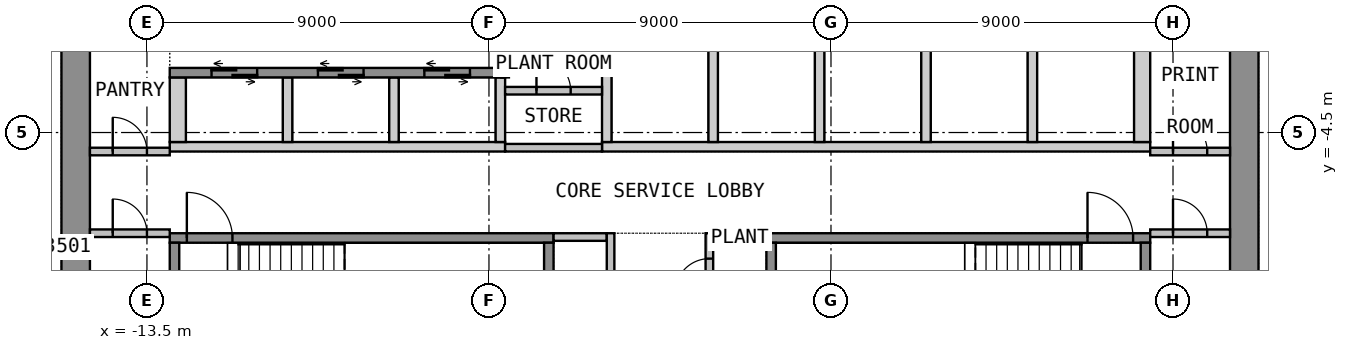
"""IFC4 building model, lengths in metres.
Left out: names, types, materials, properties, quantities, classifications, styles, units other than length and angle.
Written with IfcOpenShell. Run it as: python <this file> out.ifc"""

import sys

from ifc_helpers import new_model, si_unit, direction, frame, frame_2d, origin, place, context, subcontext, project, spatial, polyline, rectangle, outline, extrude, element, fill, save


model = new_model("IFC4")
c1 = context("Model", 3, precision=1e-05, world=origin(), true_north=direction((0.0, 1.0)))
c2 = subcontext(c1, "Body", "Model", "MODEL_VIEW")
j1 = project(units=[si_unit("LENGTHUNIT", "METRE"), si_unit("PLANEANGLEUNIT", "RADIAN")], contexts=[c1])
p1 = place(None, origin())
s1 = spatial("IfcSite", under=j1, at=p1, CompositionType="ELEMENT")
p2 = place(p1, origin())
s2 = spatial("IfcBuilding", under=s1, at=p2, CompositionType="ELEMENT")
p3 = place(p2, frame((0.0, 0.0, 144.3)))
s3 = spatial("IfcBuildingStorey", under=s2, at=p3, CompositionType="ELEMENT", Elevation=144.3)
p4 = place(p3, frame((-15.375, -12.75, 0.0), z_axis=(0.0, 0.0, 1.0), x_axis=(0.0, 1.0, 0.0)))
e1 = element("IfcWall", 1, at=p4, inside=s3, PredefinedType="SHEAR", context=c2, shape_type="SweptSolid", body=[
    extrude(rectangle(XDim=25.5, YDim=0.75, at=frame_2d((12.75, 0.0))), origin(), (0.0, 0.0, 1.0), 3.575),
])
p5 = place(p4, frame((11.55, 0.0, 0.0)))
e2 = element("IfcOpeningElement", 2, at=p5, cuts=e1, PredefinedType="OPENING", context=c2, shape_type="SweptSolid", body=[
    extrude(rectangle(XDim=2.4, YDim=2.1, at=frame_2d((1.2, 1.05))), frame((0.0, 0.385, 0.0), z_axis=(0.0, -1.0, 0.0), x_axis=(1.0, 0.0, 0.0)), (0.0, 0.0, 1.0), 0.77),
])
p6 = place(p3, frame((15.375, -12.75, 0.0), z_axis=(0.0, 0.0, 1.0), x_axis=(0.0, 1.0, 0.0)))
e3 = element("IfcWall", 3, at=p6, inside=s3, PredefinedType="SHEAR", context=c2, shape_type="SweptSolid", body=[
    extrude(rectangle(XDim=25.5, YDim=0.75, at=frame_2d((12.75, 0.0))), origin(), (0.0, 0.0, 1.0), 3.575),
])
p7 = place(p6, frame((11.55, 0.0, 0.0)))
e4 = element("IfcOpeningElement", 4, at=p7, cuts=e3, PredefinedType="OPENING", context=c2, shape_type="SweptSolid", body=[
    extrude(rectangle(XDim=2.4, YDim=2.1, at=frame_2d((1.2, 1.05))), frame((0.0, 0.385, 0.0), z_axis=(0.0, -1.0, 0.0), x_axis=(1.0, 0.0, 0.0)), (0.0, 0.0, 1.0), 0.77),
])
p8 = place(p3, origin())
e5 = element("IfcWall", 5, at=p8, inside=s3, PredefinedType="SHEAR", context=c2, shape_type="SweptSolid", body=[
    extrude(outline(polyline([(-12.9, -5.0), (-4.075, -5.0), (-4.075, -4.75), (-12.9, -4.75), (-12.9, -5.0)])), origin(), (0.0, 0.0, 1.0), 3.575),
])
p9 = place(p3, origin())
e6 = element("IfcWall", 6, at=p9, inside=s3, PredefinedType="SHEAR", context=c2, shape_type="SweptSolid", body=[
    extrude(outline(polyline([(-1.525, -5.0), (12.9, -5.0), (12.9, -4.75), (-1.525, -4.75), (-1.525, -5.0)])), origin(), (0.0, 0.0, 1.0), 3.575),
])
p10 = place(p3, origin())
e7 = element("IfcWall", 7, at=p10, inside=s3, PredefinedType="SHEAR", context=c2, shape_type="SweptSolid", body=[
    extrude(outline(polyline([(-12.9, -4.75), (-12.475, -4.75), (-12.475, -3.05), (-12.9, -3.05), (-12.9, -4.75)])), origin(), (0.0, 0.0, 1.0), 3.575),
])
p11 = place(p3, origin())
e8 = element("IfcWall", 8, at=p11, inside=s3, PredefinedType="SHEAR", context=c2, shape_type="SweptSolid", body=[
    extrude(outline(polyline([(-9.925, -4.75), (-9.675, -4.75), (-9.675, -3.05), (-9.925, -3.05), (-9.925, -4.75)])), origin(), (0.0, 0.0, 1.0), 3.575),
])
p12 = place(p3, origin())
e9 = element("IfcWall", 9, at=p12, inside=s3, PredefinedType="SHEAR", context=c2, shape_type="SweptSolid", body=[
    extrude(outline(polyline([(-7.125, -4.75), (-6.875, -4.75), (-6.875, -3.05), (-7.125, -3.05), (-7.125, -4.75)])), origin(), (0.0, 0.0, 1.0), 3.575),
])
p13 = place(p3, origin())
e10 = element("IfcWall", 10, at=p13, inside=s3, PredefinedType="SHEAR", context=c2, shape_type="SweptSolid", body=[
    extrude(outline(polyline([(-4.325, -4.75), (-4.075, -4.75), (-4.075, -3.05), (-4.325, -3.05), (-4.325, -4.75)])), origin(), (0.0, 0.0, 1.0), 3.575),
])
p14 = place(p3, origin())
e11 = element("IfcWall", 11, at=p14, inside=s3, PredefinedType="SHEAR", context=c2, shape_type="SweptSolid", body=[
    extrude(outline(polyline([(-1.525, -4.75), (-1.275, -4.75), (-1.275, -2.05), (-1.525, -2.05), (-1.525, -4.75)])), origin(), (0.0, 0.0, 1.0), 3.575),
])
p15 = place(p3, origin())
e12 = element("IfcWall", 12, at=p15, inside=s3, PredefinedType="SHEAR", context=c2, shape_type="SweptSolid", body=[
    extrude(outline(polyline([(1.275, -4.75), (1.525, -4.75), (1.525, -2.05), (1.275, -2.05), (1.275, -4.75)])), origin(), (0.0, 0.0, 1.0), 3.575),
])
p16 = place(p3, origin())
e13 = element("IfcWall", 13, at=p16, inside=s3, PredefinedType="SHEAR", context=c2, shape_type="SweptSolid", body=[
    extrude(outline(polyline([(4.075, -4.75), (4.325, -4.75), (4.325, -2.05), (4.075, -2.05), (4.075, -4.75)])), origin(), (0.0, 0.0, 1.0), 3.575),
])
p17 = place(p3, origin())
e14 = element("IfcWall", 14, at=p17, inside=s3, PredefinedType="SHEAR", context=c2, shape_type="SweptSolid", body=[
    extrude(outline(polyline([(6.875, -4.75), (7.125, -4.75), (7.125, -2.05), (6.875, -2.05), (6.875, -4.75)])), origin(), (0.0, 0.0, 1.0), 3.575),
])
p18 = place(p3, origin())
e15 = element("IfcWall", 15, at=p18, inside=s3, PredefinedType="SHEAR", context=c2, shape_type="SweptSolid", body=[
    extrude(outline(polyline([(9.675, -4.75), (9.925, -4.75), (9.925, -2.05), (9.675, -2.05), (9.675, -4.75)])), origin(), (0.0, 0.0, 1.0), 3.575),
])
p19 = place(p3, origin())
e16 = element("IfcWall", 16, at=p19, inside=s3, PredefinedType="SHEAR", context=c2, shape_type="SweptSolid", body=[
    extrude(outline(polyline([(12.475, -4.75), (12.9, -4.75), (12.9, -2.05), (12.475, -2.05), (12.475, -4.75)])), origin(), (0.0, 0.0, 1.0), 3.575),
])
p20 = place(p3, frame((-12.9, -2.925, 0.0), z_axis=(0.0, 0.0, 1.0), x_axis=(1.0, 0.0, 0.0)))
e17 = element("IfcWall", 17, at=p20, inside=s3, PredefinedType="SHEAR", context=c2, shape_type="SweptSolid", body=[
    extrude(rectangle(XDim=8.825, YDim=0.25, at=frame_2d((4.413, 0.0))), origin(), (0.0, 0.0, 1.0), 3.575),
])
p21 = place(p20, frame((1.1, 0.0, 0.0)))
e18 = element("IfcOpeningElement", 18, at=p21, cuts=e17, PredefinedType="OPENING", context=c2, shape_type="SweptSolid", body=[
    extrude(rectangle(XDim=1.2, YDim=2.1, at=frame_2d((0.6, 1.05))), frame((0.0, 0.135, 0.0), z_axis=(0.0, -1.0, 0.0), x_axis=(1.0, 0.0, 0.0)), (0.0, 0.0, 1.0), 0.27),
])
p22 = place(p20, frame((3.9, 0.0, 0.0)))
e19 = element("IfcOpeningElement", 19, at=p22, cuts=e17, PredefinedType="OPENING", context=c2, shape_type="SweptSolid", body=[
    extrude(rectangle(XDim=1.2, YDim=2.1, at=frame_2d((0.6, 1.05))), frame((0.0, 0.135, 0.0), z_axis=(0.0, -1.0, 0.0), x_axis=(1.0, 0.0, 0.0)), (0.0, 0.0, 1.0), 0.27),
])
p23 = place(p20, frame((6.7, 0.0, 0.0)))
e20 = element("IfcOpeningElement", 20, at=p23, cuts=e17, PredefinedType="OPENING", context=c2, shape_type="SweptSolid", body=[
    extrude(rectangle(XDim=1.2, YDim=2.1, at=frame_2d((0.6, 1.05))), frame((0.0, 0.135, 0.0), z_axis=(0.0, -1.0, 0.0), x_axis=(1.0, 0.0, 0.0)), (0.0, 0.0, 1.0), 0.27),
])
p24 = place(p3, frame((-12.9, -7.275, 0.0), z_axis=(0.0, 0.0, 1.0), x_axis=(1.0, 0.0, 0.0)))
e21 = element("IfcWall", 21, at=p24, inside=s3, PredefinedType="SHEAR", context=c2, shape_type="SweptSolid", body=[
    extrude(rectangle(XDim=10.1, YDim=0.25, at=frame_2d((5.05, 0.0))), origin(), (0.0, 0.0, 1.0), 3.575),
])
p25 = place(p24, frame((0.45, 0.0, 0.0)))
e22 = element("IfcOpeningElement", 22, at=p25, cuts=e21, PredefinedType="OPENING", context=c2, shape_type="SweptSolid", body=[
    extrude(rectangle(XDim=1.2, YDim=2.1, at=frame_2d((0.6, 1.05))), frame((0.0, 0.135, 0.0), z_axis=(0.0, -1.0, 0.0), x_axis=(1.0, 0.0, 0.0)), (0.0, 0.0, 1.0), 0.27),
])
for number, where, z_axis, x_axis in (
    (23, (-12.775, -10.65, 0.0), (0.0, 0.0, 1.0), (0.0, 1.0, 0.0)),
    (24, (-2.925, -10.65, 0.0), (0.0, 0.0, 1.0), (0.0, 1.0, 0.0)),
):
    element("IfcWall", number, at=place(p3, frame(where, z_axis=z_axis, x_axis=x_axis)), inside=s3, PredefinedType="SHEAR", context=c2, shape_type="SweptSolid", body=[
        extrude(rectangle(XDim=3.25, YDim=0.25, at=frame_2d((1.625, 0.0))), origin(), (0.0, 0.0, 1.0), 3.575),
    ])
p26 = place(p3, frame((2.8, -7.275, 0.0), z_axis=(0.0, 0.0, 1.0), x_axis=(1.0, 0.0, 0.0)))
e25 = element("IfcWall", 25, at=p26, inside=s3, PredefinedType="SHEAR", context=c2, shape_type="SweptSolid", body=[
    extrude(rectangle(XDim=10.1, YDim=0.25, at=frame_2d((5.05, 0.0))), origin(), (0.0, 0.0, 1.0), 3.575),
])
p27 = place(p26, frame((8.45, 0.0, 0.0)))
e26 = element("IfcOpeningElement", 26, at=p27, cuts=e25, PredefinedType="OPENING", context=c2, shape_type="SweptSolid", body=[
    extrude(rectangle(XDim=1.2, YDim=2.1, at=frame_2d((0.6, 1.05))), frame((0.0, 0.135, 0.0), z_axis=(0.0, -1.0, 0.0), x_axis=(1.0, 0.0, 0.0)), (0.0, 0.0, 1.0), 0.27),
])
for number, where, z_axis, x_axis in (
    (27, (2.925, -10.65, 0.0), (0.0, 0.0, 1.0), (0.0, 1.0, 0.0)),
    (28, (12.775, -10.65, 0.0), (0.0, 0.0, 1.0), (0.0, 1.0, 0.0)),
):
    element("IfcWall", number, at=place(p3, frame(where, z_axis=z_axis, x_axis=x_axis)), inside=s3, PredefinedType="SHEAR", context=c2, shape_type="SweptSolid", body=[
        extrude(rectangle(XDim=3.25, YDim=0.25, at=frame_2d((1.625, 0.0))), origin(), (0.0, 0.0, 1.0), 3.575),
    ])
for number, where, z_axis, x_axis in (
    (29, (-2.8, -7.25, 0.0), (0.0, 0.0, 1.0), (1.0, 0.0, 0.0)),
    (30, (1.4, -7.25, 0.0), (0.0, 0.0, 1.0), (1.0, 0.0, 0.0)),
):
    element("IfcWall", number, at=place(p3, frame(where, z_axis=z_axis, x_axis=x_axis)), inside=s3, PredefinedType="PARTITIONING", context=c2, shape_type="SweptSolid", body=[
        extrude(rectangle(XDim=1.4, YDim=0.2, at=frame_2d((0.7, 0.0))), origin(), (0.0, 0.0, 1.0), 3.575),
    ])
p28 = place(p3, frame((-1.3, -12.75, 0.0), z_axis=(0.0, 0.0, 1.0), x_axis=(0.0, 1.0, 0.0)))
e31 = element("IfcWall", 31, at=p28, inside=s3, PredefinedType="PARTITIONING", context=c2, shape_type="SweptSolid", body=[
    extrude(rectangle(XDim=5.6, YDim=0.2, at=frame_2d((2.8, 0.0))), origin(), (0.0, 0.0, 1.0), 3.575),
])
p29 = place(p28, frame((2.25, 0.0, 0.0)))
e32 = element("IfcOpeningElement", 32, at=p29, cuts=e31, PredefinedType="OPENING", context=c2, shape_type="SweptSolid", body=[
    extrude(rectangle(XDim=0.9, YDim=2.1, at=frame_2d((0.45, 1.05))), frame((0.0, 0.11, 0.0), z_axis=(0.0, -1.0, 0.0), x_axis=(1.0, 0.0, 0.0)), (0.0, 0.0, 1.0), 0.22),
])
p30 = place(p3, frame((1.3, -12.75, 0.0), z_axis=(0.0, 0.0, 1.0), x_axis=(0.0, 1.0, 0.0)))
e33 = element("IfcWall", 33, at=p30, inside=s3, PredefinedType="PARTITIONING", context=c2, shape_type="SweptSolid", body=[
    extrude(rectangle(XDim=5.6, YDim=0.2, at=frame_2d((2.8, 0.0))), origin(), (0.0, 0.0, 1.0), 3.575),
])
p31 = place(p30, frame((0.441, 0.0, 0.0)))
e34 = element("IfcOpeningElement", 34, at=p31, cuts=e33, PredefinedType="OPENING", context=c2, shape_type="SweptSolid", body=[
    extrude(rectangle(XDim=0.9, YDim=2.1, at=frame_2d((0.45, 1.05))), frame((0.0, 0.11, 0.0), z_axis=(0.0, -1.0, 0.0), x_axis=(1.0, 0.0, 0.0)), (0.0, 0.0, 1.0), 0.22),
])
p32 = place(p30, frame((2.223, 0.0, 0.0)))
e35 = element("IfcOpeningElement", 35, at=p32, cuts=e33, PredefinedType="OPENING", context=c2, shape_type="SweptSolid", body=[
    extrude(rectangle(XDim=0.9, YDim=2.1, at=frame_2d((0.45, 1.05))), frame((0.0, 0.11, 0.0), z_axis=(0.0, -1.0, 0.0), x_axis=(1.0, 0.0, 0.0)), (0.0, 0.0, 1.0), 0.22),
])
p33 = place(p30, frame((4.032, 0.0, 0.0)))
e36 = element("IfcOpeningElement", 36, at=p33, cuts=e33, PredefinedType="OPENING", context=c2, shape_type="SweptSolid", body=[
    extrude(rectangle(XDim=0.9, YDim=2.1, at=frame_2d((0.45, 1.05))), frame((0.0, 0.11, 0.0), z_axis=(0.0, -1.0, 0.0), x_axis=(1.0, 0.0, 0.0)), (0.0, 0.0, 1.0), 0.22),
])
p34 = place(p3, frame((-15.0, -7.15, 0.0), z_axis=(0.0, 0.0, 1.0), x_axis=(1.0, 0.0, 0.0)))
e37 = element("IfcWall", 37, at=p34, inside=s3, PredefinedType="PARTITIONING", context=c2, shape_type="SweptSolid", body=[
    extrude(rectangle(XDim=2.1, YDim=0.2, at=frame_2d((1.05, 0.0))), origin(), (0.0, 0.0, 1.0), 3.575),
])
p35 = place(p34, frame((0.6, 0.0, 0.0)))
e38 = element("IfcOpeningElement", 38, at=p35, cuts=e37, PredefinedType="OPENING", context=c2, shape_type="SweptSolid", body=[
    extrude(rectangle(XDim=0.9, YDim=2.1, at=frame_2d((0.45, 1.05))), frame((0.0, 0.11, 0.0), z_axis=(0.0, -1.0, 0.0), x_axis=(1.0, 0.0, 0.0)), (0.0, 0.0, 1.0), 0.22),
])
p36 = place(p3, frame((-15.0, -5.0, 0.0), z_axis=(0.0, 0.0, 1.0), x_axis=(1.0, 0.0, 0.0)))
e39 = element("IfcWall", 39, at=p36, inside=s3, PredefinedType="PARTITIONING", context=c2, shape_type="SweptSolid", body=[
    extrude(rectangle(XDim=2.1, YDim=0.2, at=frame_2d((1.05, 0.0))), origin(), (0.0, 0.0, 1.0), 3.575),
])
p37 = place(p36, frame((0.6, 0.0, 0.0)))
e40 = element("IfcOpeningElement", 40, at=p37, cuts=e39, PredefinedType="OPENING", context=c2, shape_type="SweptSolid", body=[
    extrude(rectangle(XDim=0.9, YDim=2.1, at=frame_2d((0.45, 1.05))), frame((0.0, 0.11, 0.0), z_axis=(0.0, -1.0, 0.0), x_axis=(1.0, 0.0, 0.0)), (0.0, 0.0, 1.0), 0.22),
])
p38 = place(p3, frame((12.9, -7.15, 0.0), z_axis=(0.0, 0.0, 1.0), x_axis=(1.0, 0.0, 0.0)))
e41 = element("IfcWall", 41, at=p38, inside=s3, PredefinedType="PARTITIONING", context=c2, shape_type="SweptSolid", body=[
    extrude(rectangle(XDim=2.1, YDim=0.2, at=frame_2d((1.05, 0.0))), origin(), (0.0, 0.0, 1.0), 3.575),
])
p39 = place(p38, frame((0.6, 0.0, 0.0)))
e42 = element("IfcOpeningElement", 42, at=p39, cuts=e41, PredefinedType="OPENING", context=c2, shape_type="SweptSolid", body=[
    extrude(rectangle(XDim=0.9, YDim=2.1, at=frame_2d((0.45, 1.05))), frame((0.0, 0.11, 0.0), z_axis=(0.0, -1.0, 0.0), x_axis=(1.0, 0.0, 0.0)), (0.0, 0.0, 1.0), 0.22),
])
p40 = place(p3, frame((12.9, -5.0, 0.0), z_axis=(0.0, 0.0, 1.0), x_axis=(1.0, 0.0, 0.0)))
e43 = element("IfcWall", 43, at=p40, inside=s3, PredefinedType="PARTITIONING", context=c2, shape_type="SweptSolid", body=[
    extrude(rectangle(XDim=2.1, YDim=0.2, at=frame_2d((1.05, 0.0))), origin(), (0.0, 0.0, 1.0), 3.575),
])
p41 = place(p40, frame((0.6, 0.0, 0.0)))
e44 = element("IfcOpeningElement", 44, at=p41, cuts=e43, PredefinedType="OPENING", context=c2, shape_type="SweptSolid", body=[
    extrude(rectangle(XDim=0.9, YDim=2.1, at=frame_2d((0.45, 1.05))), frame((0.0, 0.11, 0.0), z_axis=(0.0, -1.0, 0.0), x_axis=(1.0, 0.0, 0.0)), (0.0, 0.0, 1.0), 0.22),
])
p42 = place(p3, frame((-4.075, -3.4, 0.0), z_axis=(0.0, 0.0, 1.0), x_axis=(1.0, 0.0, 0.0)))
e45 = element("IfcWall", 45, at=p42, inside=s3, PredefinedType="PARTITIONING", context=c2, shape_type="SweptSolid", body=[
    extrude(rectangle(XDim=2.55, YDim=0.2, at=frame_2d((1.275, 0.0))), origin(), (0.0, 0.0, 1.0), 3.575),
])
p43 = place(p42, frame((0.825, 0.0, 0.0)))
e46 = element("IfcOpeningElement", 46, at=p43, cuts=e45, PredefinedType="OPENING", context=c2, shape_type="SweptSolid", body=[
    extrude(rectangle(XDim=0.9, YDim=2.1, at=frame_2d((0.45, 1.05))), frame((0.0, 0.11, 0.0), z_axis=(0.0, -1.0, 0.0), x_axis=(1.0, 0.0, 0.0)), (0.0, 0.0, 1.0), 0.22),
])
p44 = place(p3, frame((-4.075, -4.9, 0.0), z_axis=(0.0, 0.0, 1.0), x_axis=(1.0, 0.0, 0.0)))
e47 = element("IfcWall", 47, at=p44, inside=s3, PredefinedType="PARTITIONING", context=c2, shape_type="SweptSolid", body=[
    extrude(rectangle(XDim=2.55, YDim=0.2, at=frame_2d((1.275, 0.0))), origin(), (0.0, 0.0, 1.0), 3.575),
])
p45 = place(p3, frame((-4.075, -1.9, 0.0), z_axis=(0.0, 0.0, 1.0), x_axis=(0.0, -1.0, 0.0)))
e48 = element("IfcWall", 48, at=p45, inside=s3, PredefinedType="PARTITIONING", context=c2, shape_type="SweptSolid", body=[
    extrude(rectangle(XDim=1.15, YDim=0.2, at=frame_2d((0.575, 0.0))), origin(), (0.0, 0.0, 1.0), 3.575),
])
p46 = place(p21, origin())
e49 = element("IfcDoor", 49, at=p46, inside=s3, OperationType="DOUBLE_DOOR_SLIDING", PredefinedType="DOOR", context=c2, shape_type="SweptSolid", body=[
    extrude(rectangle(XDim=1.2, YDim=2.1, at=frame_2d((0.6, 1.05))), frame((0.0, 0.025, 0.0), z_axis=(0.0, -1.0, 0.0), x_axis=(1.0, 0.0, 0.0)), (0.0, 0.0, 1.0), 0.05),
])
fill(e18, e49)
p47 = place(p22, origin())
e50 = element("IfcDoor", 50, at=p47, inside=s3, OperationType="DOUBLE_DOOR_SLIDING", PredefinedType="DOOR", context=c2, shape_type="SweptSolid", body=[
    extrude(rectangle(XDim=1.2, YDim=2.1, at=frame_2d((0.6, 1.05))), frame((0.0, 0.025, 0.0), z_axis=(0.0, -1.0, 0.0), x_axis=(1.0, 0.0, 0.0)), (0.0, 0.0, 1.0), 0.05),
])
fill(e19, e50)
p48 = place(p23, origin())
e51 = element("IfcDoor", 51, at=p48, inside=s3, OperationType="DOUBLE_DOOR_SLIDING", PredefinedType="DOOR", context=c2, shape_type="SweptSolid", body=[
    extrude(rectangle(XDim=1.2, YDim=2.1, at=frame_2d((0.6, 1.05))), frame((0.0, 0.025, 0.0), z_axis=(0.0, -1.0, 0.0), x_axis=(1.0, 0.0, 0.0)), (0.0, 0.0, 1.0), 0.05),
])
fill(e20, e51)
p49 = place(p25, origin())
e52 = element("IfcDoor", 52, at=p49, inside=s3, OperationType="SINGLE_SWING_LEFT", PredefinedType="DOOR", context=c2, shape_type="SweptSolid", body=[
    extrude(rectangle(XDim=1.2, YDim=2.1, at=frame_2d((0.6, 1.05))), frame((0.0, 0.025, 0.0), z_axis=(0.0, -1.0, 0.0), x_axis=(1.0, 0.0, 0.0)), (0.0, 0.0, 1.0), 0.05),
])
fill(e22, e52)
p50 = place(p27, origin())
e53 = element("IfcDoor", 53, at=p50, inside=s3, OperationType="SINGLE_SWING_LEFT", PredefinedType="DOOR", context=c2, shape_type="SweptSolid", body=[
    extrude(rectangle(XDim=1.2, YDim=2.1, at=frame_2d((0.6, 1.05))), frame((0.0, 0.025, 0.0), z_axis=(0.0, -1.0, 0.0), x_axis=(1.0, 0.0, 0.0)), (0.0, 0.0, 1.0), 0.05),
])
fill(e26, e53)
p51 = place(p33, origin())
e54 = element("IfcDoor", 54, at=p51, inside=s3, OperationType="SINGLE_SWING_LEFT", PredefinedType="DOOR", context=c2, shape_type="SweptSolid", body=[
    extrude(rectangle(XDim=0.9, YDim=2.1, at=frame_2d((0.45, 1.05))), frame((0.0, 0.025, 0.0), z_axis=(0.0, -1.0, 0.0), x_axis=(1.0, 0.0, 0.0)), (0.0, 0.0, 1.0), 0.05),
])
fill(e36, e54)
p52 = place(p35, origin())
e55 = element("IfcDoor", 55, at=p52, inside=s3, OperationType="SINGLE_SWING_LEFT", PredefinedType="DOOR", context=c2, shape_type="SweptSolid", body=[
    extrude(rectangle(XDim=0.9, YDim=2.1, at=frame_2d((0.45, 1.05))), frame((0.0, 0.025, 0.0), z_axis=(0.0, -1.0, 0.0), x_axis=(1.0, 0.0, 0.0)), (0.0, 0.0, 1.0), 0.05),
])
fill(e38, e55)
p53 = place(p37, origin())
e56 = element("IfcDoor", 56, at=p53, inside=s3, OperationType="SINGLE_SWING_LEFT", PredefinedType="DOOR", context=c2, shape_type="SweptSolid", body=[
    extrude(rectangle(XDim=0.9, YDim=2.1, at=frame_2d((0.45, 1.05))), frame((0.0, 0.025, 0.0), z_axis=(0.0, -1.0, 0.0), x_axis=(1.0, 0.0, 0.0)), (0.0, 0.0, 1.0), 0.05),
])
fill(e40, e56)
p54 = place(p39, origin())
e57 = element("IfcDoor", 57, at=p54, inside=s3, OperationType="SINGLE_SWING_LEFT", PredefinedType="DOOR", context=c2, shape_type="SweptSolid", body=[
    extrude(rectangle(XDim=0.9, YDim=2.1, at=frame_2d((0.45, 1.05))), frame((0.0, 0.025, 0.0), z_axis=(0.0, -1.0, 0.0), x_axis=(1.0, 0.0, 0.0)), (0.0, 0.0, 1.0), 0.05),
])
fill(e42, e57)
p55 = place(p41, origin())
e58 = element("IfcDoor", 58, at=p55, inside=s3, OperationType="SINGLE_SWING_LEFT", PredefinedType="DOOR", context=c2, shape_type="SweptSolid", body=[
    extrude(rectangle(XDim=0.9, YDim=2.1, at=frame_2d((0.45, 1.05))), frame((0.0, 0.025, 0.0), z_axis=(0.0, -1.0, 0.0), x_axis=(1.0, 0.0, 0.0)), (0.0, 0.0, 1.0), 0.05),
])
fill(e44, e58)
p56 = place(p43, origin())
e59 = element("IfcDoor", 59, at=p56, inside=s3, OperationType="SINGLE_SWING_LEFT", PredefinedType="DOOR", context=c2, shape_type="SweptSolid", body=[
    extrude(rectangle(XDim=0.9, YDim=2.1, at=frame_2d((0.45, 1.05))), frame((0.0, 0.025, 0.0), z_axis=(0.0, -1.0, 0.0), x_axis=(1.0, 0.0, 0.0)), (0.0, 0.0, 1.0), 0.05),
])
fill(e46, e59)
save(model, sys.argv[1])
